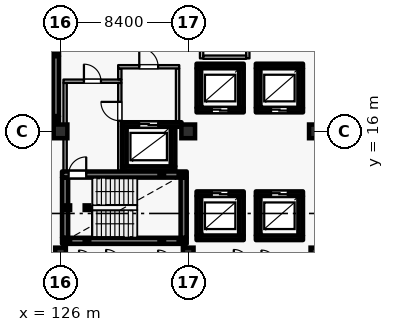
"""IFC4 building model, lengths in metres.
Left out: names, types, materials, properties, quantities, classifications, styles, units other than length and angle.
Written with IfcOpenShell. Run it as: python <this file> out.ifc"""

import sys

from ifc_helpers import new_model, si_unit, direction, frame, frame_2d, origin, origin_2d, place, context, subcontext, project, spatial, rectangle, hollow_rectangle, extrude, element, fill, save


model = new_model("IFC4")
c1 = context("Model", 3, precision=1e-05, world=origin(), true_north=direction((0.0, 1.0)))
c2 = subcontext(c1, "Body", "Model", "MODEL_VIEW")
j1 = project(units=[si_unit("LENGTHUNIT", "METRE"), si_unit("PLANEANGLEUNIT", "RADIAN")], contexts=[c1])
p1 = place(None, origin())
s1 = spatial("IfcSite", under=j1, at=p1, CompositionType="ELEMENT")
p2 = place(p1, origin())
s2 = spatial("IfcBuilding", under=s1, at=p2, CompositionType="ELEMENT")
p3 = place(p2, frame((0.0, 0.0, 25.2)))
s3 = spatial("IfcBuildingStorey", under=s2, at=p3, CompositionType="ELEMENT", Elevation=25.2)
for number, where, z_axis, x_axis in (
    (1, (126.0, 16.0, 0.0), (0.0, 0.0, 1.0), (1.0, 0.0, 0.0)),
    (2, (134.4, 16.0, 0.0), (0.0, 0.0, 1.0), (1.0, 0.0, 0.0)),
    (3, (142.8, 16.0, 0.0), (0.0, 0.0, 1.0), (1.0, 0.0, 0.0)),
):
    element("IfcColumn", number, at=place(p3, frame(where, z_axis=z_axis, x_axis=x_axis)), inside=s3, PredefinedType="COLUMN", context=c2, shape_type="SweptSolid", body=[
        extrude(rectangle(XDim=0.9, YDim=0.9, at=origin_2d()), origin(), (0.0, 0.0, 1.0), 3.6),
    ])
for number, where, z_axis, x_axis in (
    (4, (126.0, 8.0, 0.0), (0.0, 0.0, 1.0), (1.0, 0.0, 0.0)),
    (5, (134.4, 8.0, 0.0), (0.0, 0.0, 1.0), (1.0, 0.0, 0.0)),
    (6, (142.8, 8.0, 0.0), (0.0, 0.0, 1.0), (1.0, 0.0, 0.0)),
):
    element("IfcColumn", number, at=place(p3, frame(where, z_axis=z_axis, x_axis=x_axis)), inside=s3, PredefinedType="COLUMN", context=c2, shape_type="SweptSolid", body=[
        extrude(rectangle(XDim=0.7, YDim=0.7, at=origin_2d()), origin(), (0.0, 0.0, 1.0), 3.6),
    ])
p4 = place(p3, frame((134.95, 17.4, 0.0), z_axis=(0.0, 0.0, 1.0), x_axis=(1.0, 0.0, 0.0)))
e7 = element("IfcWall", 7, at=p4, inside=s3, PredefinedType="SHEAR", context=c2, shape_type="SweptSolid", body=[
    extrude(rectangle(XDim=3.1, YDim=0.3, at=frame_2d((1.55, 0.0))), origin(), (0.0, 0.0, 1.0), 3.335),
])
p5 = place(p4, frame((1.0, 0.0, 0.0)))
e8 = element("IfcOpeningElement", 8, at=p5, cuts=e7, PredefinedType="OPENING", context=c2, shape_type="SweptSolid", body=[
    extrude(rectangle(XDim=1.1, YDim=2.2, at=frame_2d((0.55, 1.1))), frame((0.0, 0.16, 0.0), z_axis=(0.0, -1.0, 0.0), x_axis=(1.0, 0.0, 0.0)), (0.0, 0.0, 1.0), 0.32),
])
p6 = place(p3, frame((137.9, 17.555, 0.0), z_axis=(0.0, 0.0, 1.0), x_axis=(0.0, 1.0, 0.0)))
e9 = element("IfcWall", 9, at=p6, inside=s3, PredefinedType="SHEAR", context=c2, shape_type="SweptSolid", body=[
    extrude(rectangle(XDim=2.59, YDim=0.3, at=frame_2d((1.295, 0.0))), origin(), (0.0, 0.0, 1.0), 3.335),
])
p7 = place(p3, frame((138.05, 20.3, 0.0), z_axis=(0.0, 0.0, 1.0), x_axis=(-1.0, 0.0, 0.0)))
e10 = element("IfcWall", 10, at=p7, inside=s3, PredefinedType="SHEAR", context=c2, shape_type="SweptSolid", body=[
    extrude(rectangle(XDim=3.1, YDim=0.3, at=frame_2d((1.55, 0.0))), origin(), (0.0, 0.0, 1.0), 3.335),
])
p8 = place(p3, frame((135.1, 20.145, 0.0), z_axis=(0.0, 0.0, 1.0), x_axis=(0.0, -1.0, 0.0)))
e11 = element("IfcWall", 11, at=p8, inside=s3, PredefinedType="SHEAR", context=c2, shape_type="SweptSolid", body=[
    extrude(rectangle(XDim=2.59, YDim=0.3, at=frame_2d((1.295, 0.0))), origin(), (0.0, 0.0, 1.0), 3.335),
])
p9 = place(p3, frame((138.85, 17.4, 0.0), z_axis=(0.0, 0.0, 1.0), x_axis=(1.0, 0.0, 0.0)))
e12 = element("IfcWall", 12, at=p9, inside=s3, PredefinedType="SHEAR", context=c2, shape_type="SweptSolid", body=[
    extrude(rectangle(XDim=3.1, YDim=0.3, at=frame_2d((1.55, 0.0))), origin(), (0.0, 0.0, 1.0), 3.335),
])
p10 = place(p9, frame((1.0, 0.0, 0.0)))
e13 = element("IfcOpeningElement", 13, at=p10, cuts=e12, PredefinedType="OPENING", context=c2, shape_type="SweptSolid", body=[
    extrude(rectangle(XDim=1.1, YDim=2.2, at=frame_2d((0.55, 1.1))), frame((0.0, 0.16, 0.0), z_axis=(0.0, -1.0, 0.0), x_axis=(1.0, 0.0, 0.0)), (0.0, 0.0, 1.0), 0.32),
])
p11 = place(p3, frame((141.8, 17.555, 0.0), z_axis=(0.0, 0.0, 1.0), x_axis=(0.0, 1.0, 0.0)))
e14 = element("IfcWall", 14, at=p11, inside=s3, PredefinedType="SHEAR", context=c2, shape_type="SweptSolid", body=[
    extrude(rectangle(XDim=2.59, YDim=0.3, at=frame_2d((1.295, 0.0))), origin(), (0.0, 0.0, 1.0), 3.335),
])
p12 = place(p3, frame((141.95, 20.3, 0.0), z_axis=(0.0, 0.0, 1.0), x_axis=(-1.0, 0.0, 0.0)))
e15 = element("IfcWall", 15, at=p12, inside=s3, PredefinedType="SHEAR", context=c2, shape_type="SweptSolid", body=[
    extrude(rectangle(XDim=3.1, YDim=0.3, at=frame_2d((1.55, 0.0))), origin(), (0.0, 0.0, 1.0), 3.335),
])
p13 = place(p3, frame((139.0, 20.145, 0.0), z_axis=(0.0, 0.0, 1.0), x_axis=(0.0, -1.0, 0.0)))
e16 = element("IfcWall", 16, at=p13, inside=s3, PredefinedType="SHEAR", context=c2, shape_type="SweptSolid", body=[
    extrude(rectangle(XDim=2.59, YDim=0.3, at=frame_2d((1.295, 0.0))), origin(), (0.0, 0.0, 1.0), 3.335),
])
p14 = place(p3, frame((134.95, 9.0, 0.0), z_axis=(0.0, 0.0, 1.0), x_axis=(1.0, 0.0, 0.0)))
e17 = element("IfcWall", 17, at=p14, inside=s3, PredefinedType="SHEAR", context=c2, shape_type="SweptSolid", body=[
    extrude(rectangle(XDim=3.1, YDim=0.3, at=frame_2d((1.55, 0.0))), origin(), (0.0, 0.0, 1.0), 3.335),
])
p15 = place(p3, frame((137.9, 9.155, 0.0), z_axis=(0.0, 0.0, 1.0), x_axis=(0.0, 1.0, 0.0)))
e18 = element("IfcWall", 18, at=p15, inside=s3, PredefinedType="SHEAR", context=c2, shape_type="SweptSolid", body=[
    extrude(rectangle(XDim=2.59, YDim=0.3, at=frame_2d((1.295, 0.0))), origin(), (0.0, 0.0, 1.0), 3.335),
])
p16 = place(p3, frame((138.05, 11.9, 0.0), z_axis=(0.0, 0.0, 1.0), x_axis=(-1.0, 0.0, 0.0)))
e19 = element("IfcWall", 19, at=p16, inside=s3, PredefinedType="SHEAR", context=c2, shape_type="SweptSolid", body=[
    extrude(rectangle(XDim=3.1, YDim=0.3, at=frame_2d((1.55, 0.0))), origin(), (0.0, 0.0, 1.0), 3.335),
])
p17 = place(p16, frame((1.0, 0.0, 0.0)))
e20 = element("IfcOpeningElement", 20, at=p17, cuts=e19, PredefinedType="OPENING", context=c2, shape_type="SweptSolid", body=[
    extrude(rectangle(XDim=1.1, YDim=2.2, at=frame_2d((0.55, 1.1))), frame((0.0, 0.16, 0.0), z_axis=(0.0, -1.0, 0.0), x_axis=(1.0, 0.0, 0.0)), (0.0, 0.0, 1.0), 0.32),
])
p18 = place(p3, frame((135.1, 11.745, 0.0), z_axis=(0.0, 0.0, 1.0), x_axis=(0.0, -1.0, 0.0)))
e21 = element("IfcWall", 21, at=p18, inside=s3, PredefinedType="SHEAR", context=c2, shape_type="SweptSolid", body=[
    extrude(rectangle(XDim=2.59, YDim=0.3, at=frame_2d((1.295, 0.0))), origin(), (0.0, 0.0, 1.0), 3.335),
])
p19 = place(p3, frame((138.85, 9.0, 0.0), z_axis=(0.0, 0.0, 1.0), x_axis=(1.0, 0.0, 0.0)))
e22 = element("IfcWall", 22, at=p19, inside=s3, PredefinedType="SHEAR", context=c2, shape_type="SweptSolid", body=[
    extrude(rectangle(XDim=3.1, YDim=0.3, at=frame_2d((1.55, 0.0))), origin(), (0.0, 0.0, 1.0), 3.335),
])
p20 = place(p3, frame((141.8, 9.155, 0.0), z_axis=(0.0, 0.0, 1.0), x_axis=(0.0, 1.0, 0.0)))
e23 = element("IfcWall", 23, at=p20, inside=s3, PredefinedType="SHEAR", context=c2, shape_type="SweptSolid", body=[
    extrude(rectangle(XDim=2.59, YDim=0.3, at=frame_2d((1.295, 0.0))), origin(), (0.0, 0.0, 1.0), 3.335),
])
p21 = place(p3, frame((141.95, 11.9, 0.0), z_axis=(0.0, 0.0, 1.0), x_axis=(-1.0, 0.0, 0.0)))
e24 = element("IfcWall", 24, at=p21, inside=s3, PredefinedType="SHEAR", context=c2, shape_type="SweptSolid", body=[
    extrude(rectangle(XDim=3.1, YDim=0.3, at=frame_2d((1.55, 0.0))), origin(), (0.0, 0.0, 1.0), 3.335),
])
p22 = place(p21, frame((1.0, 0.0, 0.0)))
e25 = element("IfcOpeningElement", 25, at=p22, cuts=e24, PredefinedType="OPENING", context=c2, shape_type="SweptSolid", body=[
    extrude(rectangle(XDim=1.1, YDim=2.2, at=frame_2d((0.55, 1.1))), frame((0.0, 0.16, 0.0), z_axis=(0.0, -1.0, 0.0), x_axis=(1.0, 0.0, 0.0)), (0.0, 0.0, 1.0), 0.32),
])
p23 = place(p3, frame((139.0, 11.745, 0.0), z_axis=(0.0, 0.0, 1.0), x_axis=(0.0, -1.0, 0.0)))
e26 = element("IfcWall", 26, at=p23, inside=s3, PredefinedType="SHEAR", context=c2, shape_type="SweptSolid", body=[
    extrude(rectangle(XDim=2.59, YDim=0.3, at=frame_2d((1.295, 0.0))), origin(), (0.0, 0.0, 1.0), 3.335),
])
p24 = place(p3, frame((130.05, 13.55, 0.0), z_axis=(0.0, 0.0, 1.0), x_axis=(1.0, 0.0, 0.0)))
e27 = element("IfcWall", 27, at=p24, inside=s3, PredefinedType="SHEAR", context=c2, shape_type="SweptSolid", body=[
    extrude(rectangle(XDim=3.5, YDim=0.3, at=frame_2d((1.75, 0.0))), origin(), (0.0, 0.0, 1.0), 3.335),
])
p25 = place(p3, frame((133.4, 13.705, 0.0), z_axis=(0.0, 0.0, 1.0), x_axis=(0.0, 1.0, 0.0)))
e28 = element("IfcWall", 28, at=p25, inside=s3, PredefinedType="SHEAR", context=c2, shape_type="SweptSolid", body=[
    extrude(rectangle(XDim=2.59, YDim=0.3, at=frame_2d((1.295, 0.0))), origin(), (0.0, 0.0, 1.0), 3.335),
])
p26 = place(p3, frame((133.96, 16.45, 0.0), z_axis=(0.0, 0.0, 1.0), x_axis=(-1.0, 0.0, 0.0)))
e29 = element("IfcWall", 29, at=p26, inside=s3, PredefinedType="SHEAR", context=c2, shape_type="SweptSolid", body=[
    extrude(rectangle(XDim=3.91, YDim=0.3, at=frame_2d((1.955, 0.0))), origin(), (0.0, 0.0, 1.0), 3.335),
])
p27 = place(p26, frame((1.535, 0.0, 0.0)))
e30 = element("IfcOpeningElement", 30, at=p27, cuts=e29, PredefinedType="OPENING", context=c2, shape_type="SweptSolid", body=[
    extrude(rectangle(XDim=1.25, YDim=2.25, at=frame_2d((0.625, 1.125))), frame((0.0, 0.16, 0.0), z_axis=(0.0, -1.0, 0.0), x_axis=(1.0, 0.0, 0.0)), (0.0, 0.0, 1.0), 0.32),
])
p28 = place(p3, frame((130.2, 16.295, 0.0), z_axis=(0.0, 0.0, 1.0), x_axis=(0.0, -1.0, 0.0)))
e31 = element("IfcWall", 31, at=p28, inside=s3, PredefinedType="SHEAR", context=c2, shape_type="SweptSolid", body=[
    extrude(rectangle(XDim=2.59, YDim=0.3, at=frame_2d((1.295, 0.0))), origin(), (0.0, 0.0, 1.0), 3.335),
])
p29 = place(p3, frame((126.1, 8.8, 0.0), z_axis=(0.0, 0.0, 1.0), x_axis=(1.0, 0.0, 0.0)))
e32 = element("IfcWall", 32, at=p29, inside=s3, PredefinedType="SHEAR", context=c2, shape_type="SweptSolid", body=[
    extrude(rectangle(XDim=8.2, YDim=0.4, at=frame_2d((4.1, 0.0))), origin(), (0.0, 0.0, 1.0), 3.335),
])
p30 = place(p3, frame((134.1, 9.005, 0.0), z_axis=(0.0, 0.0, 1.0), x_axis=(0.0, 1.0, 0.0)))
e33 = element("IfcWall", 33, at=p30, inside=s3, PredefinedType="SHEAR", context=c2, shape_type="SweptSolid", body=[
    extrude(rectangle(XDim=3.95, YDim=0.4, at=frame_2d((1.975, 0.0))), origin(), (0.0, 0.0, 1.0), 3.335),
])
p31 = place(p3, frame((126.1, 13.16, 0.0), z_axis=(0.0, 0.0, 1.0), x_axis=(1.0, 0.0, 0.0)))
e34 = element("IfcWall", 34, at=p31, inside=s3, PredefinedType="SHEAR", context=c2, shape_type="SweptSolid", body=[
    extrude(rectangle(XDim=8.2, YDim=0.4, at=frame_2d((4.1, 0.0))), origin(), (0.0, 0.0, 1.0), 3.335),
])
p32 = place(p31, frame((0.43, 0.0, 0.0)))
e35 = element("IfcOpeningElement", 35, at=p32, cuts=e34, PredefinedType="OPENING", context=c2, shape_type="SweptSolid", body=[
    extrude(rectangle(XDim=1.16, YDim=2.2, at=frame_2d((0.58, 1.1))), frame((0.0, 0.21, 0.0), z_axis=(0.0, -1.0, 0.0), x_axis=(1.0, 0.0, 0.0)), (0.0, 0.0, 1.0), 0.42),
])
p33 = place(p3, frame((126.3, 9.005, 0.0), z_axis=(0.0, 0.0, 1.0), x_axis=(0.0, 1.0, 0.0)))
e36 = element("IfcWall", 36, at=p33, inside=s3, PredefinedType="SHEAR", context=c2, shape_type="SweptSolid", body=[
    extrude(rectangle(XDim=3.95, YDim=0.4, at=frame_2d((1.975, 0.0))), origin(), (0.0, 0.0, 1.0), 3.335),
])
p34 = place(p3, frame((126.3, 13.365, 0.0), z_axis=(0.0, 0.0, 1.0), x_axis=(0.0, 1.0, 0.0)))
e37 = element("IfcWall", 37, at=p34, inside=s3, PredefinedType="PARTITIONING", context=c2, shape_type="SweptSolid", body=[
    extrude(rectangle(XDim=5.82, YDim=0.22, at=frame_2d((2.91, 0.0))), origin(), (0.0, 0.0, 1.0), 3.335),
])
p35 = place(p3, frame((126.19, 19.3, 0.0), z_axis=(0.0, 0.0, 1.0), x_axis=(1.0, 0.0, 0.0)))
e38 = element("IfcWall", 38, at=p35, inside=s3, PredefinedType="PARTITIONING", context=c2, shape_type="SweptSolid", body=[
    extrude(rectangle(XDim=3.82, YDim=0.22, at=frame_2d((1.91, 0.0))), origin(), (0.0, 0.0, 1.0), 3.335),
])
p36 = place(p35, frame((1.35, 0.0, 0.0)))
e39 = element("IfcOpeningElement", 39, at=p36, cuts=e38, PredefinedType="OPENING", context=c2, shape_type="SweptSolid", body=[
    extrude(rectangle(XDim=1.12, YDim=2.2, at=frame_2d((0.56, 1.1))), frame((0.0, 0.12, 0.0), z_axis=(0.0, -1.0, 0.0), x_axis=(1.0, 0.0, 0.0)), (0.0, 0.0, 1.0), 0.24),
])
p37 = place(p3, frame((129.9, 13.365, 0.0), z_axis=(0.0, 0.0, 1.0), x_axis=(0.0, 1.0, 0.0)))
e40 = element("IfcWall", 40, at=p37, inside=s3, PredefinedType="PARTITIONING", context=c2, shape_type="SweptSolid", body=[
    extrude(rectangle(XDim=5.82, YDim=0.22, at=frame_2d((2.91, 0.0))), origin(), (0.0, 0.0, 1.0), 3.335),
])
p38 = place(p37, frame((3.335, 0.0, 0.0)))
e41 = element("IfcOpeningElement", 41, at=p38, cuts=e40, PredefinedType="OPENING", context=c2, shape_type="SweptSolid", body=[
    extrude(rectangle(XDim=1.24, YDim=2.2, at=frame_2d((0.62, 1.1))), frame((0.0, 0.12, 0.0), z_axis=(0.0, -1.0, 0.0), x_axis=(1.0, 0.0, 0.0)), (0.0, 0.0, 1.0), 0.24),
])
p39 = place(p3, frame((129.9, 19.415, 0.0), z_axis=(0.0, 0.0, 1.0), x_axis=(0.0, 1.0, 0.0)))
e42 = element("IfcWall", 42, at=p39, inside=s3, PredefinedType="PARTITIONING", context=c2, shape_type="SweptSolid", body=[
    extrude(rectangle(XDim=0.72, YDim=0.22, at=frame_2d((0.36, 0.0))), origin(), (0.0, 0.0, 1.0), 3.335),
])
p40 = place(p3, frame((133.7, 16.605, 0.0), z_axis=(0.0, 0.0, 1.0), x_axis=(0.0, 1.0, 0.0)))
e43 = element("IfcWall", 43, at=p40, inside=s3, PredefinedType="PARTITIONING", context=c2, shape_type="SweptSolid", body=[
    extrude(rectangle(XDim=3.53, YDim=0.22, at=frame_2d((1.765, 0.0))), origin(), (0.0, 0.0, 1.0), 3.335),
])
p41 = place(p3, frame((129.79, 20.25, 0.0), z_axis=(0.0, 0.0, 1.0), x_axis=(1.0, 0.0, 0.0)))
e44 = element("IfcWall", 44, at=p41, inside=s3, PredefinedType="PARTITIONING", context=c2, shape_type="SweptSolid", body=[
    extrude(rectangle(XDim=4.02, YDim=0.22, at=frame_2d((2.01, 0.0))), origin(), (0.0, 0.0, 1.0), 3.335),
])
p42 = place(p41, frame((1.39, 0.0, 0.0)))
e45 = element("IfcOpeningElement", 45, at=p42, cuts=e44, PredefinedType="OPENING", context=c2, shape_type="SweptSolid", body=[
    extrude(rectangle(XDim=1.24, YDim=2.2, at=frame_2d((0.62, 1.1))), frame((0.0, 0.12, 0.0), z_axis=(0.0, -1.0, 0.0), x_axis=(1.0, 0.0, 0.0)), (0.0, 0.0, 1.0), 0.24),
])
for number, where, z_axis, x_axis in (
    (46, (126.48, 8.8, 0.0), (0.0, 0.0, 1.0), (1.0, 0.0, 0.0)),
    (47, (126.48, 10.98, 0.0), (0.0, 0.0, 1.0), (1.0, 0.0, 0.0)),
    (48, (127.74, 8.8, 0.0), (0.0, 0.0, 1.0), (1.0, 0.0, 0.0)),
    (49, (127.74, 10.98, 0.0), (0.0, 0.0, 1.0), (1.0, 0.0, 0.0)),
):
    element("IfcColumn", number, at=place(p3, frame(where, z_axis=z_axis, x_axis=x_axis)), inside=s3, PredefinedType="COLUMN", context=c2, shape_type="SweptSolid", body=[
        extrude(hollow_rectangle(XDim=0.3, YDim=0.3, WallThickness=0.012, at=origin_2d()), origin(), (0.0, 0.0, 1.0), 3.42),
    ])
for number, where, z_axis, x_axis in (
    (50, (132.66, 8.8, -2.1), (0.0, 0.0, 1.0), (1.0, 0.0, 0.0)),
    (51, (132.66, 13.16, -2.1), (0.0, 0.0, 1.0), (1.0, 0.0, 0.0)),
    (52, (133.92, 8.8, -2.1), (0.0, 0.0, 1.0), (1.0, 0.0, 0.0)),
    (53, (133.92, 13.16, -2.1), (0.0, 0.0, 1.0), (1.0, 0.0, 0.0)),
):
    element("IfcColumn", number, at=place(p3, frame(where, z_axis=z_axis, x_axis=x_axis)), inside=s3, PredefinedType="COLUMN", context=c2, shape_type="SweptSolid", body=[
        extrude(hollow_rectangle(XDim=0.3, YDim=0.3, WallThickness=0.012, at=origin_2d()), origin(), (0.0, 0.0, 1.0), 3.72),
    ])
p43 = place(p3, frame((117.75, 16.8, 0.0), z_axis=(0.0, 0.0, 1.0), x_axis=(1.0, 0.0, 0.0)))
e54 = element("IfcWall", 54, at=p43, inside=s3, PredefinedType="SHEAR", context=c2, shape_type="SweptSolid", body=[
    extrude(rectangle(XDim=8.15, YDim=0.4, at=frame_2d((4.075, 0.0))), origin(), (0.0, 0.0, 1.0), 3.335),
])
p44 = place(p3, frame((125.7, 17.005, 0.0), z_axis=(0.0, 0.0, 1.0), x_axis=(0.0, 1.0, 0.0)))
e55 = element("IfcWall", 55, at=p44, inside=s3, PredefinedType="SHEAR", context=c2, shape_type="SweptSolid", body=[
    extrude(rectangle(XDim=3.95, YDim=0.4, at=frame_2d((1.975, 0.0))), origin(), (0.0, 0.0, 1.0), 3.335),
])
p45 = place(p3, frame((117.75, 21.16, 0.0), z_axis=(0.0, 0.0, 1.0), x_axis=(1.0, 0.0, 0.0)))
e56 = element("IfcWall", 56, at=p45, inside=s3, PredefinedType="SHEAR", context=c2, shape_type="SweptSolid", body=[
    extrude(rectangle(XDim=8.15, YDim=0.4, at=frame_2d((4.075, 0.0))), origin(), (0.0, 0.0, 1.0), 3.335),
])
p46 = place(p45, frame((0.38, 0.0, 0.0)))
e57 = element("IfcOpeningElement", 57, at=p46, cuts=e56, PredefinedType="OPENING", context=c2, shape_type="SweptSolid", body=[
    extrude(rectangle(XDim=1.16, YDim=2.2, at=frame_2d((0.58, 1.1))), frame((0.0, 0.21, 0.0), z_axis=(0.0, -1.0, 0.0), x_axis=(1.0, 0.0, 0.0)), (0.0, 0.0, 1.0), 0.42),
])
for number, where, z_axis, x_axis in (
    (58, (125.52, 16.8, -2.1), (0.0, 0.0, 1.0), (1.0, 0.0, 0.0)),
    (59, (125.52, 21.16, -2.1), (0.0, 0.0, 1.0), (1.0, 0.0, 0.0)),
):
    element("IfcColumn", number, at=place(p3, frame(where, z_axis=z_axis, x_axis=x_axis)), inside=s3, PredefinedType="COLUMN", context=c2, shape_type="SweptSolid", body=[
        extrude(hollow_rectangle(XDim=0.3, YDim=0.3, WallThickness=0.012, at=origin_2d()), origin(), (0.0, 0.0, 1.0), 3.72),
    ])
for number, where, z_axis, x_axis in (
    (60, (135.28, 20.8, 0.0), (0.0, 0.0, 1.0), (0.0, 1.0, 0.0)),
    (61, (138.32, 20.8, 0.0), (0.0, 0.0, 1.0), (0.0, 1.0, 0.0)),
):
    element("IfcWall", number, at=place(p3, frame(where, z_axis=z_axis, x_axis=x_axis)), inside=s3, PredefinedType="PARTITIONING", context=c2, shape_type="SweptSolid", body=[
        extrude(rectangle(XDim=2.748, YDim=0.22, at=frame_2d((1.374, 0.0))), origin(), (0.0, 0.0, 1.0), 3.335),
    ])
p47 = place(p3, frame((135.39, 20.88, 0.0), z_axis=(0.0, 0.0, 1.0), x_axis=(1.0, 0.0, 0.0)))
e62 = element("IfcWall", 62, at=p47, inside=s3, PredefinedType="PARTITIONING", context=c2, shape_type="SweptSolid", body=[
    extrude(rectangle(XDim=2.82, YDim=0.22, at=frame_2d((1.41, 0.0))), origin(), (0.0, 0.0, 1.0), 3.335),
])
p48 = place(p5, origin())
e63 = element("IfcDoor", 63, at=p48, inside=s3, OperationType="DOUBLE_DOOR_SLIDING", PredefinedType="DOOR", context=c2, shape_type="SweptSolid", body=[
    extrude(rectangle(XDim=1.1, YDim=2.2, at=frame_2d((0.55, 1.1))), frame((0.0, 0.025, 0.0), z_axis=(0.0, -1.0, 0.0), x_axis=(1.0, 0.0, 0.0)), (0.0, 0.0, 1.0), 0.05),
])
fill(e8, e63)
p49 = place(p10, origin())
e64 = element("IfcDoor", 64, at=p49, inside=s3, OperationType="DOUBLE_DOOR_SLIDING", PredefinedType="DOOR", context=c2, shape_type="SweptSolid", body=[
    extrude(rectangle(XDim=1.1, YDim=2.2, at=frame_2d((0.55, 1.1))), frame((0.0, 0.025, 0.0), z_axis=(0.0, -1.0, 0.0), x_axis=(1.0, 0.0, 0.0)), (0.0, 0.0, 1.0), 0.05),
])
fill(e13, e64)
p50 = place(p17, origin())
e65 = element("IfcDoor", 65, at=p50, inside=s3, OperationType="DOUBLE_DOOR_SLIDING", PredefinedType="DOOR", context=c2, shape_type="SweptSolid", body=[
    extrude(rectangle(XDim=1.1, YDim=2.2, at=frame_2d((0.55, 1.1))), frame((0.0, 0.025, 0.0), z_axis=(0.0, -1.0, 0.0), x_axis=(1.0, 0.0, 0.0)), (0.0, 0.0, 1.0), 0.05),
])
fill(e20, e65)
p51 = place(p22, origin())
e66 = element("IfcDoor", 66, at=p51, inside=s3, OperationType="DOUBLE_DOOR_SLIDING", PredefinedType="DOOR", context=c2, shape_type="SweptSolid", body=[
    extrude(rectangle(XDim=1.1, YDim=2.2, at=frame_2d((0.55, 1.1))), frame((0.0, 0.025, 0.0), z_axis=(0.0, -1.0, 0.0), x_axis=(1.0, 0.0, 0.0)), (0.0, 0.0, 1.0), 0.05),
])
fill(e25, e66)
p52 = place(p27, origin())
e67 = element("IfcDoor", 67, at=p52, inside=s3, OperationType="DOUBLE_DOOR_SLIDING", PredefinedType="DOOR", context=c2, shape_type="SweptSolid", body=[
    extrude(rectangle(XDim=1.25, YDim=2.25, at=frame_2d((0.625, 1.125))), frame((0.0, 0.025, 0.0), z_axis=(0.0, -1.0, 0.0), x_axis=(1.0, 0.0, 0.0)), (0.0, 0.0, 1.0), 0.05),
])
fill(e30, e67)
p53 = place(p32, origin())
e68 = element("IfcDoor", 68, at=p53, inside=s3, OperationType="SINGLE_SWING_RIGHT", PredefinedType="DOOR", context=c2, shape_type="SweptSolid", body=[
    extrude(rectangle(XDim=1.16, YDim=2.2, at=frame_2d((0.58, 1.1))), frame((0.0, 0.025, 0.0), z_axis=(0.0, -1.0, 0.0), x_axis=(1.0, 0.0, 0.0)), (0.0, 0.0, 1.0), 0.05),
])
fill(e35, e68)
p54 = place(p36, origin())
e69 = element("IfcDoor", 69, at=p54, inside=s3, OperationType="SINGLE_SWING_LEFT", PredefinedType="DOOR", context=c2, shape_type="SweptSolid", body=[
    extrude(rectangle(XDim=1.12, YDim=2.2, at=frame_2d((0.56, 1.1))), frame((0.0, 0.025, 0.0), z_axis=(0.0, -1.0, 0.0), x_axis=(1.0, 0.0, 0.0)), (0.0, 0.0, 1.0), 0.05),
])
fill(e39, e69)
p55 = place(p38, origin())
e70 = element("IfcDoor", 70, at=p55, inside=s3, OperationType="SINGLE_SWING_RIGHT", PredefinedType="DOOR", context=c2, shape_type="SweptSolid", body=[
    extrude(rectangle(XDim=1.24, YDim=2.2, at=frame_2d((0.62, 1.1))), frame((0.0, 0.025, 0.0), z_axis=(0.0, -1.0, 0.0), x_axis=(1.0, 0.0, 0.0)), (0.0, 0.0, 1.0), 0.05),
])
fill(e41, e70)
p56 = place(p42, origin())
e71 = element("IfcDoor", 71, at=p56, inside=s3, OperationType="SINGLE_SWING_LEFT", PredefinedType="DOOR", context=c2, shape_type="SweptSolid", body=[
    extrude(rectangle(XDim=1.24, YDim=2.2, at=frame_2d((0.62, 1.1))), frame((0.0, 0.025, 0.0), z_axis=(0.0, -1.0, 0.0), x_axis=(1.0, 0.0, 0.0)), (0.0, 0.0, 1.0), 0.05),
])
fill(e45, e71)
save(model, sys.argv[1])
